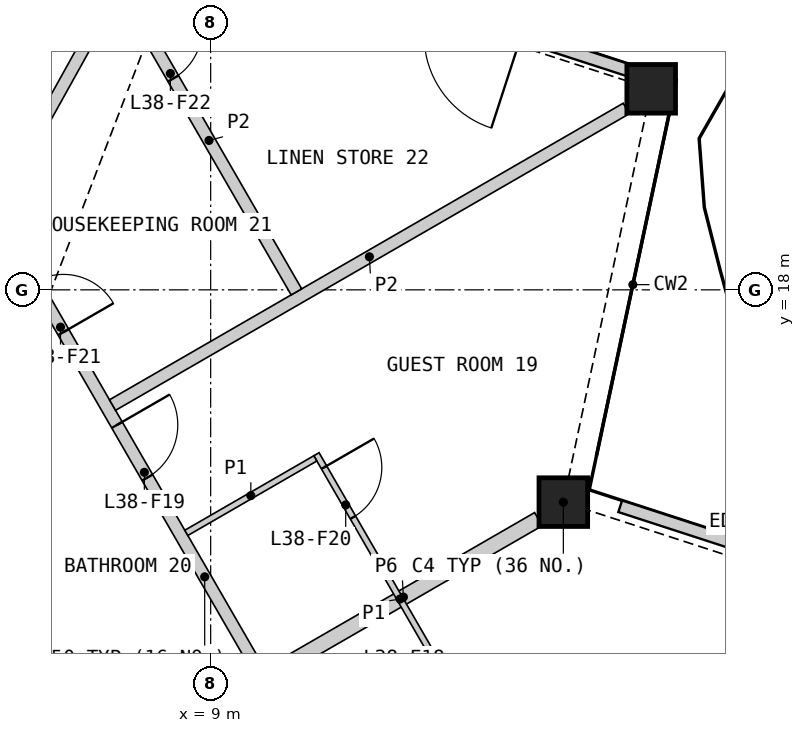
"""IFC4 building model, lengths in metres.
Left out: names, types, materials, properties, quantities, classifications, styles, units other than length and angle.
Written with IfcOpenShell. Run it as: python <this file> out.ifc"""

import sys

from ifc_helpers import new_model, si_unit, direction, frame, frame_2d, origin, origin_2d, place, context, subcontext, project, spatial, rectangle, hollow_rectangle, extrude, element, fill, save


model = new_model("IFC4")
c1 = context("Model", 3, precision=1e-05, world=origin(), true_north=direction((0.0, 1.0)))
c2 = subcontext(c1, "Body", "Model", "MODEL_VIEW")
j1 = project(units=[si_unit("LENGTHUNIT", "METRE"), si_unit("PLANEANGLEUNIT", "RADIAN")], contexts=[c1])
p1 = place(None, origin())
s1 = spatial("IfcSite", under=j1, at=p1, CompositionType="ELEMENT")
p2 = place(p1, origin())
s2 = spatial("IfcBuilding", under=s1, at=p2, CompositionType="ELEMENT")
p3 = place(p2, frame((0.0, 0.0, 180.0)))
s3 = spatial("IfcBuildingStorey", under=s2, at=p3, CompositionType="ELEMENT", Elevation=180.0)
for number, where, z_axis, x_axis in (
    (1, (14.8, 14.508, 0.0), (0.0, 0.0, 1.0), (1.0, 0.0, 0.0)),
    (2, (16.245, 21.306, 0.0), (0.0, 0.0, 1.0), (1.0, 0.0, 0.0)),
):
    element("IfcColumn", number, at=place(p3, frame(where, z_axis=z_axis, x_axis=x_axis)), inside=s3, PredefinedType="COLUMN", context=c2, shape_type="SweptSolid", body=[
        extrude(hollow_rectangle(XDim=0.8, YDim=0.8, WallThickness=0.05, at=origin_2d()), origin(), (0.0, 0.0, 1.0), 3.6),
    ])
p4 = place(p3, frame((21.217, 12.659, 0.0), z_axis=(0.0, 0.0, 1.0), x_axis=(-0.951053678976, 0.30902572661, 0.0)))
e3 = element("IfcWall", 3, at=p4, inside=s3, PredefinedType="SOLIDWALL", context=c2, shape_type="SweptSolid", body=[
    extrude(rectangle(XDim=5.763, YDim=0.2, at=frame_2d((2.882, 0.0))), origin(), (0.0, 0.0, 1.0), 2.701),
])
p5 = place(p4, frame((2.082, 0.0, 0.0)))
e4 = element("IfcOpeningElement", 4, at=p5, cuts=e3, PredefinedType="OPENING", context=c2, shape_type="SweptSolid", body=[
    extrude(rectangle(XDim=1.6, YDim=2.4, at=frame_2d((0.8, 1.2))), frame((0.0, 0.11, 0.0), z_axis=(0.0, -1.0, 0.0), x_axis=(1.0, 0.0, 0.0)), (0.0, 0.0, 1.0), 0.22),
])
p6 = place(p3, frame((16.089, 21.54, 0.0), z_axis=(0.0, 0.0, 1.0), x_axis=(-0.951053678976, 0.30902572661, 0.0)))
e5 = element("IfcWall", 5, at=p6, inside=s3, PredefinedType="SOLIDWALL", context=c2, shape_type="SweptSolid", body=[
    extrude(rectangle(XDim=5.763, YDim=0.2, at=frame_2d((2.882, 0.0))), origin(), (0.0, 0.0, 1.0), 2.701),
])
p7 = place(p6, frame((2.082, 0.0, 0.0)))
e6 = element("IfcOpeningElement", 6, at=p7, cuts=e5, PredefinedType="OPENING", context=c2, shape_type="SweptSolid", body=[
    extrude(rectangle(XDim=1.6, YDim=2.4, at=frame_2d((0.8, 1.2))), frame((0.0, 0.11, 0.0), z_axis=(0.0, -1.0, 0.0), x_axis=(1.0, 0.0, 0.0)), (0.0, 0.0, 1.0), 0.22),
])
p8 = place(p3, frame((5.377, 19.385, 0.0), z_axis=(0.0, 0.0, 1.0), x_axis=(0.500000757641, -0.86602496636, 0.0)))
e7 = element("IfcWall", 7, at=p8, inside=s3, PredefinedType="PARTITIONING", context=c2, shape_type="SweptSolid", body=[
    extrude(rectangle(XDim=28.198, YDim=0.2, at=frame_2d((14.099, 0.0))), origin(), (0.0, 0.0, 1.0), 3.25),
])
p9 = place(p8, frame((22.735, 0.0, 0.0)))
e8 = element("IfcOpeningElement", 8, at=p9, cuts=e7, PredefinedType="OPENING", context=c2, shape_type="SweptSolid", body=[
    extrude(rectangle(XDim=1.8, YDim=2.1, at=frame_2d((0.9, 1.05))), frame((0.0, 0.11, 0.0), z_axis=(0.0, -1.0, 0.0), x_axis=(1.0, 0.0, 0.0)), (0.0, 0.0, 1.0), 0.22),
])
p10 = place(p8, frame((14.402, 0.0, 0.0)))
e9 = element("IfcOpeningElement", 9, at=p10, cuts=e7, PredefinedType="OPENING", context=c2, shape_type="SweptSolid", body=[
    extrude(rectangle(XDim=1.0, YDim=2.1, at=frame_2d((0.5, 1.05))), frame((0.0, 0.11, 0.0), z_axis=(0.0, -1.0, 0.0), x_axis=(1.0, 0.0, 0.0)), (0.0, 0.0, 1.0), 0.22),
])
p11 = place(p8, frame((12.796, 0.0, 0.0)))
e10 = element("IfcOpeningElement", 10, at=p11, cuts=e7, PredefinedType="OPENING", context=c2, shape_type="SweptSolid", body=[
    extrude(rectangle(XDim=1.0, YDim=2.1, at=frame_2d((0.5, 1.05))), frame((0.0, 0.11, 0.0), z_axis=(0.0, -1.0, 0.0), x_axis=(1.0, 0.0, 0.0)), (0.0, 0.0, 1.0), 0.22),
])
p12 = place(p8, frame((4.164, 0.0, 0.0)))
e11 = element("IfcOpeningElement", 11, at=p12, cuts=e7, PredefinedType="OPENING", context=c2, shape_type="SweptSolid", body=[
    extrude(rectangle(XDim=1.0, YDim=2.1, at=frame_2d((0.5, 1.05))), frame((0.0, 0.11, 0.0), z_axis=(0.0, -1.0, 0.0), x_axis=(1.0, 0.0, 0.0)), (0.0, 0.0, 1.0), 0.22),
])
p13 = place(p8, frame((1.452, 0.0, 0.0)))
e12 = element("IfcOpeningElement", 12, at=p13, cuts=e7, PredefinedType="OPENING", context=c2, shape_type="SweptSolid", body=[
    extrude(rectangle(XDim=0.95, YDim=2.1, at=frame_2d((0.475, 1.05))), frame((0.0, 0.11, 0.0), z_axis=(0.0, -1.0, 0.0), x_axis=(1.0, 0.0, 0.0)), (0.0, 0.0, 1.0), 0.22),
])
p14 = place(p3, frame((12.513, 7.225, 0.0), z_axis=(0.0, 0.0, 1.0), x_axis=(0.866032905446, 0.499987006516, 0.0)))
e13 = element("IfcWall", 13, at=p14, inside=s3, PredefinedType="PARTITIONING", context=c2, shape_type="SweptSolid", body=[
    extrude(rectangle(XDim=9.799, YDim=0.25, at=frame_2d((4.899, 0.0))), origin(), (0.0, 0.0, 1.0), 2.404),
])
p15 = place(p3, frame((9.95, 11.665, 0.0), z_axis=(0.0, 0.0, 1.0), x_axis=(0.86603095744, 0.499990380663, 0.0)))
e14 = element("IfcWall", 14, at=p15, inside=s3, PredefinedType="PARTITIONING", context=c2, shape_type="SweptSolid", body=[
    extrude(rectangle(XDim=5.127, YDim=0.25, at=frame_2d((2.563, 0.0))), origin(), (0.0, 0.0, 1.0), 2.404),
])
p16 = place(p3, frame((5.476, 19.385, 0.0), z_axis=(0.0, 0.0, 1.0), x_axis=(0.485729569949, 0.874109137853, 0.0)))
e15 = element("IfcWall", 15, at=p16, inside=s3, PredefinedType="PARTITIONING", context=c2, shape_type="SweptSolid", body=[
    extrude(rectangle(XDim=11.962, YDim=0.2, at=frame_2d((5.981, 0.0))), origin(), (0.0, 0.0, 1.0), 2.404),
])
p17 = place(p3, frame((7.386, 16.105, 0.0), z_axis=(0.0, 0.0, 1.0), x_axis=(0.866023056814, 0.500004065051, 0.0)))
e16 = element("IfcWall", 16, at=p17, inside=s3, PredefinedType="PARTITIONING", context=c2, shape_type="SweptSolid", body=[
    extrude(rectangle(XDim=9.756, YDim=0.2, at=frame_2d((4.878, 0.0))), origin(), (0.0, 0.0, 1.0), 2.404),
])
p18 = place(p3, frame((7.534, 22.948, 0.0), z_axis=(0.0, 0.0, 1.0), x_axis=(0.499991885958, -0.866030088378, 0.0)))
e17 = element("IfcWall", 17, at=p18, inside=s3, PredefinedType="PARTITIONING", context=c2, shape_type="SweptSolid", body=[
    extrude(rectangle(XDim=5.752, YDim=0.2, at=frame_2d((2.876, 0.0))), origin(), (0.0, 0.0, 1.0), 2.404),
])
p19 = place(p18, frame((0.75, 0.0, 0.0)))
e18 = element("IfcOpeningElement", 18, at=p19, cuts=e17, PredefinedType="OPENING", context=c2, shape_type="SweptSolid", body=[
    extrude(rectangle(XDim=0.95, YDim=2.1, at=frame_2d((0.475, 1.05))), frame((0.0, 0.11, 0.0), z_axis=(0.0, -1.0, 0.0), x_axis=(1.0, 0.0, 0.0)), (0.0, 0.0, 1.0), 0.22),
])
p20 = place(p3, frame((10.74, 15.296, 0.0), z_axis=(0.0, 0.0, 1.0), x_axis=(0.500015767406, -0.866016300277, 0.0)))
e19 = element("IfcWall", 19, at=p20, inside=s3, PredefinedType="PARTITIONING", context=c2, shape_type="SweptSolid", body=[
    extrude(rectangle(XDim=5.5, YDim=0.1, at=frame_2d((2.75, 0.0))), origin(), (0.0, 0.0, 1.0), 2.404),
])
p21 = place(p20, frame((4.3, 0.0, 0.0)))
e20 = element("IfcOpeningElement", 20, at=p21, cuts=e19, PredefinedType="OPENING", context=c2, shape_type="SweptSolid", body=[
    extrude(rectangle(XDim=0.95, YDim=2.1, at=frame_2d((0.475, 1.05))), frame((0.0, 0.06, 0.0), z_axis=(0.0, -1.0, 0.0), x_axis=(1.0, 0.0, 0.0)), (0.0, 0.0, 1.0), 0.12),
])
p22 = place(p20, frame((0.25, 0.0, 0.0)))
e21 = element("IfcOpeningElement", 21, at=p22, cuts=e19, PredefinedType="OPENING", context=c2, shape_type="SweptSolid", body=[
    extrude(rectangle(XDim=0.95, YDim=2.1, at=frame_2d((0.475, 1.05))), frame((0.0, 0.06, 0.0), z_axis=(0.0, -1.0, 0.0), x_axis=(1.0, 0.0, 0.0)), (0.0, 0.0, 1.0), 0.12),
])
p23 = place(p3, frame((8.6, 14.003, 0.0), z_axis=(0.0, 0.0, 1.0), x_axis=(0.866032905446, 0.499987006516, 0.0)))
e22 = element("IfcWall", 22, at=p23, inside=s3, PredefinedType="PARTITIONING", context=c2, shape_type="SweptSolid", body=[
    extrude(rectangle(XDim=2.45, YDim=0.1, at=frame_2d((1.225, 0.0))), origin(), (0.0, 0.0, 1.0), 2.404),
])
p24 = place(p12, origin())
e23 = element("IfcDoor", 23, at=p24, inside=s3, OperationType="SINGLE_SWING_LEFT", PredefinedType="DOOR", context=c2, shape_type="SweptSolid", body=[
    extrude(rectangle(XDim=1.0, YDim=2.1, at=frame_2d((0.5, 1.05))), frame((0.0, 0.025, 0.0), z_axis=(0.0, -1.0, 0.0), x_axis=(1.0, 0.0, 0.0)), (0.0, 0.0, 1.0), 0.05),
])
fill(e11, e23)
p25 = place(p22, origin())
e24 = element("IfcDoor", 24, at=p25, inside=s3, OperationType="SINGLE_SWING_LEFT", PredefinedType="DOOR", context=c2, shape_type="SweptSolid", body=[
    extrude(rectangle(XDim=0.95, YDim=2.1, at=frame_2d((0.475, 1.05))), frame((0.0, 0.025, 0.0), z_axis=(0.0, -1.0, 0.0), x_axis=(1.0, 0.0, 0.0)), (0.0, 0.0, 1.0), 0.05),
])
fill(e21, e24)
p26 = place(p13, origin())
e25 = element("IfcDoor", 25, at=p26, inside=s3, OperationType="SINGLE_SWING_RIGHT", PredefinedType="DOOR", context=c2, shape_type="SweptSolid", body=[
    extrude(rectangle(XDim=0.95, YDim=2.1, at=frame_2d((0.475, 1.05))), frame((0.0, 0.025, 0.0), z_axis=(0.0, -1.0, 0.0), x_axis=(1.0, 0.0, 0.0)), (0.0, 0.0, 1.0), 0.05),
])
fill(e12, e25)
p27 = place(p19, origin())
e26 = element("IfcDoor", 26, at=p27, inside=s3, OperationType="SINGLE_SWING_LEFT", PredefinedType="DOOR", context=c2, shape_type="SweptSolid", body=[
    extrude(rectangle(XDim=0.95, YDim=2.1, at=frame_2d((0.475, 1.05))), frame((0.0, 0.025, 0.0), z_axis=(0.0, -1.0, 0.0), x_axis=(1.0, 0.0, 0.0)), (0.0, 0.0, 1.0), 0.05),
])
fill(e18, e26)
save(model, sys.argv[1])
